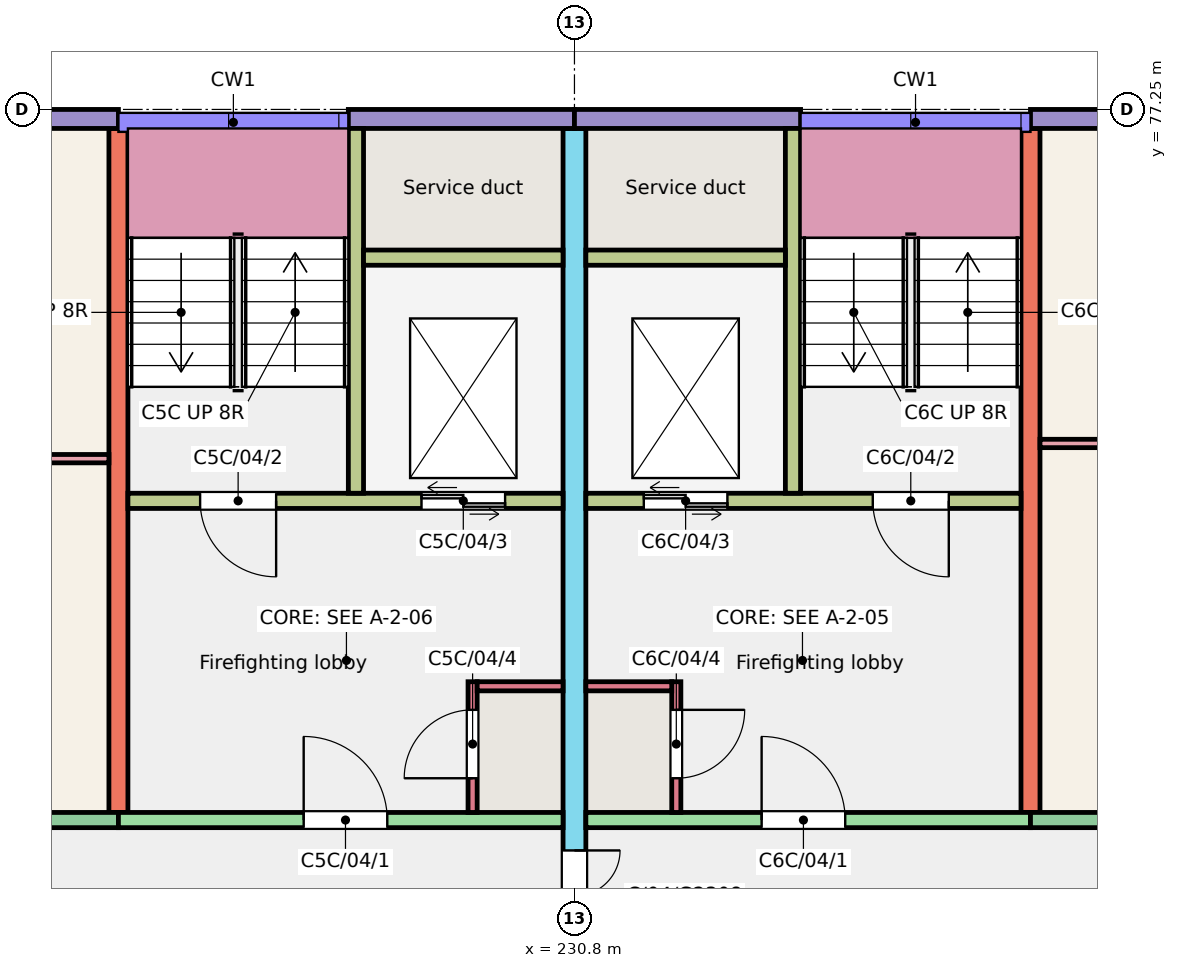
"""IFC4 building model, lengths in metres.
Left out: names, types, materials, properties, quantities, classifications, styles, units other than length and angle.
Written with IfcOpenShell. Run it as: python <this file> out.ifc"""

import sys

from ifc_helpers import new_model, si_unit, direction, frame, frame_2d, origin, place, context, subcontext, project, spatial, rectangle, extrude, element, fill, save


model = new_model("IFC4")
c1 = context("Model", 3, precision=1e-05, world=origin(), true_north=direction((0.0, 1.0)))
c2 = subcontext(c1, "Body", "Model", "MODEL_VIEW")
j1 = project(units=[si_unit("LENGTHUNIT", "METRE"), si_unit("PLANEANGLEUNIT", "RADIAN")], contexts=[c1])
p1 = place(None, origin())
s1 = spatial("IfcSite", under=j1, at=p1, CompositionType="ELEMENT")
p2 = place(p1, origin())
s2 = spatial("IfcBuilding", under=s1, at=p2, CompositionType="ELEMENT")
p3 = place(p2, frame((0.0, 0.0, 12.0)))
s3 = spatial("IfcBuildingStorey", under=s2, at=p3, CompositionType="ELEMENT", Elevation=12.0)
p4 = place(p3, frame((224.8, 68.0, 0.0), z_axis=(0.0, 0.0, 1.0), x_axis=(0.0, 1.0, 0.0)))
e1 = element("IfcWall", 1, at=p4, inside=s3, PredefinedType="SHEAR", context=c2, shape_type="SweptSolid", body=[
    extrude(rectangle(XDim=9.0, YDim=0.25, at=frame_2d((4.5, 0.0))), origin(), (0.0, 0.0, 1.0), 3.0),
])
p5 = place(p3, frame((230.8, 66.0, 0.0), z_axis=(0.0, 0.0, 1.0), x_axis=(0.0, 1.0, 0.0)))
e2 = element("IfcWall", 2, at=p5, inside=s3, PredefinedType="SHEAR", context=c2, shape_type="SweptSolid", body=[
    extrude(rectangle(XDim=11.0, YDim=0.3, at=frame_2d((5.5, 0.0))), origin(), (0.0, 0.0, 1.0), 3.0),
])
p6 = place(p5, frame((0.3, 0.0, 0.0)))
e3 = element("IfcOpeningElement", 3, at=p6, cuts=e2, PredefinedType="OPENING", context=c2, shape_type="SweptSolid", body=[
    extrude(rectangle(XDim=1.2, YDim=2.1, at=frame_2d((0.6, 1.05))), frame((0.0, 0.16, 0.0), z_axis=(0.0, -1.0, 0.0), x_axis=(1.0, 0.0, 0.0)), (0.0, 0.0, 1.0), 0.32),
])
p7 = place(p3, frame((236.8, 68.0, 0.0), z_axis=(0.0, 0.0, 1.0), x_axis=(0.0, 1.0, 0.0)))
e4 = element("IfcWall", 4, at=p7, inside=s3, PredefinedType="SHEAR", context=c2, shape_type="SweptSolid", body=[
    extrude(rectangle(XDim=9.0, YDim=0.25, at=frame_2d((4.5, 0.0))), origin(), (0.0, 0.0, 1.0), 3.0),
])
p8 = place(p3, frame((221.2, 77.125, 0.0), z_axis=(0.0, 0.0, 1.0), x_axis=(1.0, 0.0, 0.0)))
e5 = element("IfcWall", 5, at=p8, inside=s3, PredefinedType="SOLIDWALL", context=c2, shape_type="SweptSolid", body=[
    extrude(rectangle(XDim=3.6, YDim=0.25, at=frame_2d((1.8, 0.0))), origin(), (0.0, 0.0, 1.0), 3.0),
])
p9 = place(p8, frame((1.188, 0.0, 1.1)))
e6 = element("IfcOpeningElement", 6, at=p9, cuts=e5, PredefinedType="OPENING", context=c2, shape_type="SweptSolid", body=[
    extrude(rectangle(XDim=1.2, YDim=1.3, at=frame_2d((0.6, 0.65))), frame((0.0, 0.135, 0.0), z_axis=(0.0, -1.0, 0.0), x_axis=(1.0, 0.0, 0.0)), (0.0, 0.0, 1.0), 0.27),
])
p10 = place(p3, frame((221.2, 67.9, 0.0), z_axis=(0.0, 0.0, 1.0), x_axis=(1.0, 0.0, 0.0)))
e7 = element("IfcWall", 7, at=p10, inside=s3, PredefinedType="SOLIDWALL", context=c2, shape_type="SweptSolid", body=[
    extrude(rectangle(XDim=3.6, YDim=0.2, at=frame_2d((1.8, 0.0))), origin(), (0.0, 0.0, 1.0), 3.0),
])
p11 = place(p10, frame((1.038, 0.0, 0.9)))
e8 = element("IfcOpeningElement", 8, at=p11, cuts=e7, PredefinedType="OPENING", context=c2, shape_type="SweptSolid", body=[
    extrude(rectangle(XDim=1.5, YDim=1.5, at=frame_2d((0.75, 0.75))), frame((0.0, 0.11, 0.0), z_axis=(0.0, -1.0, 0.0), x_axis=(1.0, 0.0, 0.0)), (0.0, 0.0, 1.0), 0.22),
])
p12 = place(p3, frame((227.825, 77.125, 0.0), z_axis=(0.0, 0.0, 1.0), x_axis=(1.0, 0.0, 0.0)))
e9 = element("IfcWall", 9, at=p12, inside=s3, PredefinedType="SOLIDWALL", context=c2, shape_type="SweptSolid", body=[
    extrude(rectangle(XDim=2.975, YDim=0.25, at=frame_2d((1.488, 0.0))), origin(), (0.0, 0.0, 1.0), 3.0),
])
p13 = place(p3, frame((224.8, 67.9, 0.0), z_axis=(0.0, 0.0, 1.0), x_axis=(1.0, 0.0, 0.0)))
e10 = element("IfcWall", 10, at=p13, inside=s3, PredefinedType="SHEAR", context=c2, shape_type="SweptSolid", body=[
    extrude(rectangle(XDim=5.85, YDim=0.2, at=frame_2d((2.925, 0.0))), origin(), (0.0, 0.0, 1.0), 3.0),
])
p14 = place(p13, frame((2.438, 0.0, 0.0)))
e11 = element("IfcOpeningElement", 11, at=p14, cuts=e10, PredefinedType="OPENING", context=c2, shape_type="SweptSolid", body=[
    extrude(rectangle(XDim=1.1, YDim=2.1, at=frame_2d((0.55, 1.05))), frame((0.0, 0.11, 0.0), z_axis=(0.0, -1.0, 0.0), x_axis=(1.0, 0.0, 0.0)), (0.0, 0.0, 1.0), 0.22),
])
p15 = place(p3, frame((224.925, 72.1, 0.0), z_axis=(0.0, 0.0, 1.0), x_axis=(1.0, 0.0, 0.0)))
e12 = element("IfcWall", 12, at=p15, inside=s3, PredefinedType="SHEAR", context=c2, shape_type="SweptSolid", body=[
    extrude(rectangle(XDim=5.725, YDim=0.2, at=frame_2d((2.862, 0.0))), origin(), (0.0, 0.0, 1.0), 3.0),
])
p16 = place(p15, frame((0.95, 0.0, 0.0)))
e13 = element("IfcOpeningElement", 13, at=p16, cuts=e12, PredefinedType="OPENING", context=c2, shape_type="SweptSolid", body=[
    extrude(rectangle(XDim=1.0, YDim=2.1, at=frame_2d((0.5, 1.05))), frame((0.0, 0.11, 0.0), z_axis=(0.0, -1.0, 0.0), x_axis=(1.0, 0.0, 0.0)), (0.0, 0.0, 1.0), 0.22),
])
p17 = place(p15, frame((3.863, 0.0, 0.0)))
e14 = element("IfcOpeningElement", 14, at=p17, cuts=e12, PredefinedType="OPENING", context=c2, shape_type="SweptSolid", body=[
    extrude(rectangle(XDim=1.1, YDim=2.1, at=frame_2d((0.55, 1.05))), frame((0.0, 0.11, 0.0), z_axis=(0.0, -1.0, 0.0), x_axis=(1.0, 0.0, 0.0)), (0.0, 0.0, 1.0), 0.22),
])
p18 = place(p3, frame((227.925, 72.2, 0.0), z_axis=(0.0, 0.0, 1.0), x_axis=(0.0, 1.0, 0.0)))
e15 = element("IfcWall", 15, at=p18, inside=s3, PredefinedType="SHEAR", context=c2, shape_type="SweptSolid", body=[
    extrude(rectangle(XDim=4.8, YDim=0.2, at=frame_2d((2.4, 0.0))), origin(), (0.0, 0.0, 1.0), 3.0),
])
p19 = place(p3, frame((228.025, 75.3, 0.0), z_axis=(0.0, 0.0, 1.0), x_axis=(1.0, 0.0, 0.0)))
e16 = element("IfcWall", 16, at=p19, inside=s3, PredefinedType="SHEAR", context=c2, shape_type="SweptSolid", body=[
    extrude(rectangle(XDim=2.625, YDim=0.2, at=frame_2d((1.312, 0.0))), origin(), (0.0, 0.0, 1.0), 3.0),
])
p20 = place(p3, frame((229.46, 68.0, 0.0), z_axis=(0.0, 0.0, 1.0), x_axis=(0.0, 1.0, 0.0)))
e17 = element("IfcWall", 17, at=p20, inside=s3, PredefinedType="SHEAR", context=c2, shape_type="SweptSolid", body=[
    extrude(rectangle(XDim=1.72, YDim=0.12, at=frame_2d((0.86, 0.0))), origin(), (0.0, 0.0, 1.0), 3.0),
])
p21 = place(p20, frame((0.45, 0.0, 0.0)))
e18 = element("IfcOpeningElement", 18, at=p21, cuts=e17, PredefinedType="OPENING", context=c2, shape_type="SweptSolid", body=[
    extrude(rectangle(XDim=0.9, YDim=2.1, at=frame_2d((0.45, 1.05))), frame((0.0, 0.07, 0.0), z_axis=(0.0, -1.0, 0.0), x_axis=(1.0, 0.0, 0.0)), (0.0, 0.0, 1.0), 0.14),
])
p22 = place(p3, frame((229.52, 69.66, 0.0), z_axis=(0.0, 0.0, 1.0), x_axis=(1.0, 0.0, 0.0)))
e19 = element("IfcWall", 19, at=p22, inside=s3, PredefinedType="SHEAR", context=c2, shape_type="SweptSolid", body=[
    extrude(rectangle(XDim=1.13, YDim=0.12, at=frame_2d((0.565, 0.0))), origin(), (0.0, 0.0, 1.0), 3.0),
])
p23 = place(p3, frame((230.8, 77.125, 0.0), z_axis=(0.0, 0.0, 1.0), x_axis=(1.0, 0.0, 0.0)))
e20 = element("IfcWall", 20, at=p23, inside=s3, PredefinedType="SOLIDWALL", context=c2, shape_type="SweptSolid", body=[
    extrude(rectangle(XDim=2.975, YDim=0.25, at=frame_2d((1.487, 0.0))), origin(), (0.0, 0.0, 1.0), 3.0),
])
p24 = place(p3, frame((230.95, 67.9, 0.0), z_axis=(0.0, 0.0, 1.0), x_axis=(1.0, 0.0, 0.0)))
e21 = element("IfcWall", 21, at=p24, inside=s3, PredefinedType="SHEAR", context=c2, shape_type="SweptSolid", body=[
    extrude(rectangle(XDim=5.85, YDim=0.2, at=frame_2d((2.925, 0.0))), origin(), (0.0, 0.0, 1.0), 3.0),
])
p25 = place(p24, frame((2.312, 0.0, 0.0)))
e22 = element("IfcOpeningElement", 22, at=p25, cuts=e21, PredefinedType="OPENING", context=c2, shape_type="SweptSolid", body=[
    extrude(rectangle(XDim=1.1, YDim=2.1, at=frame_2d((0.55, 1.05))), frame((0.0, 0.11, 0.0), z_axis=(0.0, -1.0, 0.0), x_axis=(1.0, 0.0, 0.0)), (0.0, 0.0, 1.0), 0.22),
])
p26 = place(p3, frame((230.95, 72.1, 0.0), z_axis=(0.0, 0.0, 1.0), x_axis=(1.0, 0.0, 0.0)))
e23 = element("IfcWall", 23, at=p26, inside=s3, PredefinedType="SHEAR", context=c2, shape_type="SweptSolid", body=[
    extrude(rectangle(XDim=5.725, YDim=0.2, at=frame_2d((2.863, 0.0))), origin(), (0.0, 0.0, 1.0), 3.0),
])
p27 = place(p26, frame((3.775, 0.0, 0.0)))
e24 = element("IfcOpeningElement", 24, at=p27, cuts=e23, PredefinedType="OPENING", context=c2, shape_type="SweptSolid", body=[
    extrude(rectangle(XDim=1.0, YDim=2.1, at=frame_2d((0.5, 1.05))), frame((0.0, 0.11, 0.0), z_axis=(0.0, -1.0, 0.0), x_axis=(1.0, 0.0, 0.0)), (0.0, 0.0, 1.0), 0.22),
])
p28 = place(p26, frame((0.762, 0.0, 0.0)))
e25 = element("IfcOpeningElement", 25, at=p28, cuts=e23, PredefinedType="OPENING", context=c2, shape_type="SweptSolid", body=[
    extrude(rectangle(XDim=1.1, YDim=2.1, at=frame_2d((0.55, 1.05))), frame((0.0, 0.11, 0.0), z_axis=(0.0, -1.0, 0.0), x_axis=(1.0, 0.0, 0.0)), (0.0, 0.0, 1.0), 0.22),
])
p29 = place(p3, frame((233.675, 72.2, 0.0), z_axis=(0.0, 0.0, 1.0), x_axis=(0.0, 1.0, 0.0)))
e26 = element("IfcWall", 26, at=p29, inside=s3, PredefinedType="SHEAR", context=c2, shape_type="SweptSolid", body=[
    extrude(rectangle(XDim=4.8, YDim=0.2, at=frame_2d((2.4, 0.0))), origin(), (0.0, 0.0, 1.0), 3.0),
])
p30 = place(p3, frame((230.95, 75.3, 0.0), z_axis=(0.0, 0.0, 1.0), x_axis=(1.0, 0.0, 0.0)))
e27 = element("IfcWall", 27, at=p30, inside=s3, PredefinedType="SHEAR", context=c2, shape_type="SweptSolid", body=[
    extrude(rectangle(XDim=2.625, YDim=0.2, at=frame_2d((1.312, 0.0))), origin(), (0.0, 0.0, 1.0), 3.0),
])
p31 = place(p3, frame((232.14, 68.0, 0.0), z_axis=(0.0, 0.0, 1.0), x_axis=(0.0, 1.0, 0.0)))
e28 = element("IfcWall", 28, at=p31, inside=s3, PredefinedType="SHEAR", context=c2, shape_type="SweptSolid", body=[
    extrude(rectangle(XDim=1.72, YDim=0.12, at=frame_2d((0.86, 0.0))), origin(), (0.0, 0.0, 1.0), 3.0),
])
p32 = place(p31, frame((0.45, 0.0, 0.0)))
e29 = element("IfcOpeningElement", 29, at=p32, cuts=e28, PredefinedType="OPENING", context=c2, shape_type="SweptSolid", body=[
    extrude(rectangle(XDim=0.9, YDim=2.1, at=frame_2d((0.45, 1.05))), frame((0.0, 0.07, 0.0), z_axis=(0.0, -1.0, 0.0), x_axis=(1.0, 0.0, 0.0)), (0.0, 0.0, 1.0), 0.14),
])
p33 = place(p3, frame((230.95, 69.66, 0.0), z_axis=(0.0, 0.0, 1.0), x_axis=(1.0, 0.0, 0.0)))
e30 = element("IfcWall", 30, at=p33, inside=s3, PredefinedType="SHEAR", context=c2, shape_type="SweptSolid", body=[
    extrude(rectangle(XDim=1.13, YDim=0.12, at=frame_2d((0.565, 0.0))), origin(), (0.0, 0.0, 1.0), 3.0),
])
p34 = place(p3, frame((236.8, 77.125, 0.0), z_axis=(0.0, 0.0, 1.0), x_axis=(1.0, 0.0, 0.0)))
e31 = element("IfcWall", 31, at=p34, inside=s3, PredefinedType="SOLIDWALL", context=c2, shape_type="SweptSolid", body=[
    extrude(rectangle(XDim=3.6, YDim=0.25, at=frame_2d((1.8, 0.0))), origin(), (0.0, 0.0, 1.0), 3.0),
])
p35 = place(p34, frame((1.062, 0.0, 0.9)))
e32 = element("IfcOpeningElement", 32, at=p35, cuts=e31, PredefinedType="OPENING", context=c2, shape_type="SweptSolid", body=[
    extrude(rectangle(XDim=1.5, YDim=1.5, at=frame_2d((0.75, 0.75))), frame((0.0, 0.135, 0.0), z_axis=(0.0, -1.0, 0.0), x_axis=(1.0, 0.0, 0.0)), (0.0, 0.0, 1.0), 0.27),
])
p36 = place(p3, frame((236.8, 67.9, 0.0), z_axis=(0.0, 0.0, 1.0), x_axis=(1.0, 0.0, 0.0)))
e33 = element("IfcWall", 33, at=p36, inside=s3, PredefinedType="SOLIDWALL", context=c2, shape_type="SweptSolid", body=[
    extrude(rectangle(XDim=3.6, YDim=0.2, at=frame_2d((1.8, 0.0))), origin(), (0.0, 0.0, 1.0), 3.0),
])
p37 = place(p36, frame((1.062, 0.0, 0.9)))
e34 = element("IfcOpeningElement", 34, at=p37, cuts=e33, PredefinedType="OPENING", context=c2, shape_type="SweptSolid", body=[
    extrude(rectangle(XDim=1.5, YDim=1.5, at=frame_2d((0.75, 0.75))), frame((0.0, 0.11, 0.0), z_axis=(0.0, -1.0, 0.0), x_axis=(1.0, 0.0, 0.0)), (0.0, 0.0, 1.0), 0.22),
])
for number, where, z_axis, x_axis in (
    (35, (221.3, 72.655, 0.0), (0.0, 0.0, 1.0), (1.0, 0.0, 0.0)),
    (36, (236.925, 72.855, 0.0), (0.0, 0.0, 1.0), (1.0, 0.0, 0.0)),
):
    element("IfcWall", number, at=place(p3, frame(where, z_axis=z_axis, x_axis=x_axis)), inside=s3, PredefinedType="PARTITIONING", context=c2, shape_type="SweptSolid", body=[
        extrude(rectangle(XDim=3.375, YDim=0.11, at=frame_2d((1.688, 0.0))), origin(), (0.0, 0.0, 1.0), 2.8),
    ])
p38 = place(p14, origin())
e37 = element("IfcDoor", 37, at=p38, inside=s3, OperationType="SINGLE_SWING_LEFT", PredefinedType="DOOR", context=c2, shape_type="SweptSolid", body=[
    extrude(rectangle(XDim=1.1, YDim=2.1, at=frame_2d((0.55, 1.05))), frame((0.0, 0.025, 0.0), z_axis=(0.0, -1.0, 0.0), x_axis=(1.0, 0.0, 0.0)), (0.0, 0.0, 1.0), 0.05),
])
fill(e11, e37)
p39 = place(p16, origin())
e38 = element("IfcDoor", 38, at=p39, inside=s3, OperationType="SINGLE_SWING_RIGHT", PredefinedType="DOOR", context=c2, shape_type="SweptSolid", body=[
    extrude(rectangle(XDim=1.0, YDim=2.1, at=frame_2d((0.5, 1.05))), frame((0.0, 0.025, 0.0), z_axis=(0.0, -1.0, 0.0), x_axis=(1.0, 0.0, 0.0)), (0.0, 0.0, 1.0), 0.05),
])
fill(e13, e38)
p40 = place(p17, origin())
e39 = element("IfcDoor", 39, at=p40, inside=s3, OperationType="DOUBLE_DOOR_SLIDING", PredefinedType="DOOR", context=c2, shape_type="SweptSolid", body=[
    extrude(rectangle(XDim=1.1, YDim=2.1, at=frame_2d((0.55, 1.05))), frame((0.0, 0.025, 0.0), z_axis=(0.0, -1.0, 0.0), x_axis=(1.0, 0.0, 0.0)), (0.0, 0.0, 1.0), 0.05),
])
fill(e14, e39)
p41 = place(p21, origin())
e40 = element("IfcDoor", 40, at=p41, inside=s3, OperationType="SINGLE_SWING_LEFT", PredefinedType="DOOR", context=c2, shape_type="SweptSolid", body=[
    extrude(rectangle(XDim=0.9, YDim=2.1, at=frame_2d((0.45, 1.05))), frame((0.0, 0.025, 0.0), z_axis=(0.0, -1.0, 0.0), x_axis=(1.0, 0.0, 0.0)), (0.0, 0.0, 1.0), 0.05),
])
fill(e18, e40)
p42 = place(p25, origin())
e41 = element("IfcDoor", 41, at=p42, inside=s3, OperationType="SINGLE_SWING_LEFT", PredefinedType="DOOR", context=c2, shape_type="SweptSolid", body=[
    extrude(rectangle(XDim=1.1, YDim=2.1, at=frame_2d((0.55, 1.05))), frame((0.0, 0.025, 0.0), z_axis=(0.0, -1.0, 0.0), x_axis=(1.0, 0.0, 0.0)), (0.0, 0.0, 1.0), 0.05),
])
fill(e22, e41)
p43 = place(p27, origin())
e42 = element("IfcDoor", 42, at=p43, inside=s3, OperationType="SINGLE_SWING_RIGHT", PredefinedType="DOOR", context=c2, shape_type="SweptSolid", body=[
    extrude(rectangle(XDim=1.0, YDim=2.1, at=frame_2d((0.5, 1.05))), frame((0.0, 0.025, 0.0), z_axis=(0.0, -1.0, 0.0), x_axis=(1.0, 0.0, 0.0)), (0.0, 0.0, 1.0), 0.05),
])
fill(e24, e42)
p44 = place(p28, origin())
e43 = element("IfcDoor", 43, at=p44, inside=s3, OperationType="DOUBLE_DOOR_SLIDING", PredefinedType="DOOR", context=c2, shape_type="SweptSolid", body=[
    extrude(rectangle(XDim=1.1, YDim=2.1, at=frame_2d((0.55, 1.05))), frame((0.0, 0.025, 0.0), z_axis=(0.0, -1.0, 0.0), x_axis=(1.0, 0.0, 0.0)), (0.0, 0.0, 1.0), 0.05),
])
fill(e25, e43)
p45 = place(p32, origin())
e44 = element("IfcDoor", 44, at=p45, inside=s3, OperationType="SINGLE_SWING_RIGHT", PredefinedType="DOOR", context=c2, shape_type="SweptSolid", body=[
    extrude(rectangle(XDim=0.9, YDim=2.1, at=frame_2d((0.45, 1.05))), frame((0.0, 0.025, 0.0), z_axis=(0.0, -1.0, 0.0), x_axis=(1.0, 0.0, 0.0)), (0.0, 0.0, 1.0), 0.05),
])
fill(e29, e44)
p46 = place(p6, origin())
e45 = element("IfcDoor", 45, at=p46, inside=s3, OperationType="DOUBLE_DOOR_SINGLE_SWING", PredefinedType="DOOR", context=c2, shape_type="SweptSolid", body=[
    extrude(rectangle(XDim=1.2, YDim=2.1, at=frame_2d((0.6, 1.05))), frame((0.0, 0.025, 0.0), z_axis=(0.0, -1.0, 0.0), x_axis=(1.0, 0.0, 0.0)), (0.0, 0.0, 1.0), 0.05),
])
fill(e3, e45)
save(model, sys.argv[1])
